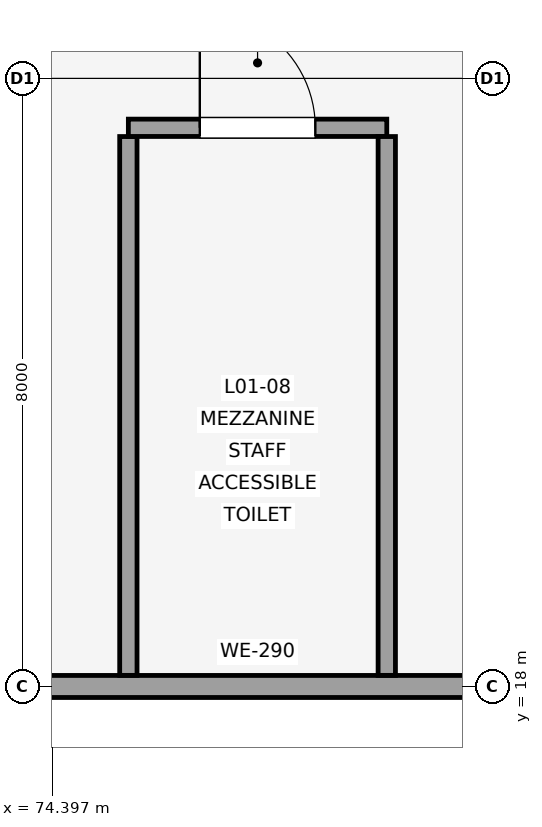
"""IFC4 building model, lengths in metres.
Left out: names, types, materials, properties, quantities, classifications, styles, units other than length and angle.
Written with IfcOpenShell. Run it as: python <this file> out.ifc"""

import sys

from ifc_helpers import new_model, si_unit, direction, frame, frame_2d, origin, place, context, subcontext, project, spatial, rectangle, extrude, element, fill, save


model = new_model("IFC4")
c1 = context("Model", 3, precision=1e-05, world=origin(), true_north=direction((0.0, 1.0)))
c2 = subcontext(c1, "Body", "Model", "MODEL_VIEW")
j1 = project(units=[si_unit("LENGTHUNIT", "METRE"), si_unit("PLANEANGLEUNIT", "RADIAN")], contexts=[c1])
p1 = place(None, origin())
s1 = spatial("IfcSite", under=j1, at=p1, CompositionType="ELEMENT")
p2 = place(p1, origin())
s2 = spatial("IfcBuilding", under=s1, at=p2, CompositionType="ELEMENT")
p3 = place(p2, frame((0.0, 0.0, 4.5)))
s3 = spatial("IfcBuildingStorey", under=s2, at=p3, CompositionType="ELEMENT", Elevation=4.5)
p4 = place(p3, frame((72.275, 18.0, 0.0), z_axis=(0.0, 0.0, 1.0), x_axis=(1.0, 0.0, 0.0)))
e1 = element("IfcWall", 1, at=p4, inside=s3, PredefinedType="SOLIDWALL", context=c2, shape_type="SweptSolid", body=[
    extrude(rectangle(XDim=9.65, YDim=0.29, at=frame_2d((4.825, 0.0))), origin(), (0.0, 0.0, 1.0), 3.12),
])
p5 = place(p3, frame((75.4, 18.146, 0.0), z_axis=(0.0, 0.0, 1.0), x_axis=(0.0, 1.0, 0.0)))
e2 = element("IfcWall", 2, at=p5, inside=s3, PredefinedType="PLUMBINGWALL", context=c2, shape_type="SweptSolid", body=[
    extrude(rectangle(XDim=7.089, YDim=0.228, at=frame_2d((3.544, 0.0))), origin(), (0.0, 0.0, 1.0), 2.7),
])
p6 = place(p3, frame((75.4, 25.35, 0.0), z_axis=(0.0, 0.0, 1.0), x_axis=(1.0, 0.0, 0.0)))
e3 = element("IfcWall", 3, at=p6, inside=s3, PredefinedType="PLUMBINGWALL", context=c2, shape_type="SweptSolid", body=[
    extrude(rectangle(XDim=3.4, YDim=0.228, at=frame_2d((1.7, 0.0))), origin(), (0.0, 0.0, 1.0), 2.7),
])
p7 = place(p6, frame((0.94, 0.0, 0.0)))
e4 = element("IfcOpeningElement", 4, at=p7, cuts=e3, PredefinedType="OPENING", context=c2, shape_type="SweptSolid", body=[
    extrude(rectangle(XDim=1.52, YDim=2.2, at=frame_2d((0.76, 1.1))), frame((0.0, 0.124, 0.0), z_axis=(0.0, -1.0, 0.0), x_axis=(1.0, 0.0, 0.0)), (0.0, 0.0, 1.0), 0.248),
])
p8 = place(p3, frame((78.8, 25.235, 0.0), z_axis=(0.0, 0.0, 1.0), x_axis=(0.0, -1.0, 0.0)))
e5 = element("IfcWall", 5, at=p8, inside=s3, PredefinedType="PLUMBINGWALL", context=c2, shape_type="SweptSolid", body=[
    extrude(rectangle(XDim=7.089, YDim=0.228, at=frame_2d((3.544, 0.0))), origin(), (0.0, 0.0, 1.0), 2.7),
])
p9 = place(p7, origin())
e6 = element("IfcDoor", 6, at=p9, inside=s3, OperationType="SINGLE_SWING_LEFT", PredefinedType="DOOR", context=c2, shape_type="SweptSolid", body=[
    extrude(rectangle(XDim=1.52, YDim=2.2, at=frame_2d((0.76, 1.1))), frame((0.0, 0.025, 0.0), z_axis=(0.0, -1.0, 0.0), x_axis=(1.0, 0.0, 0.0)), (0.0, 0.0, 1.0), 0.05),
])
fill(e4, e6)
save(model, sys.argv[1])
